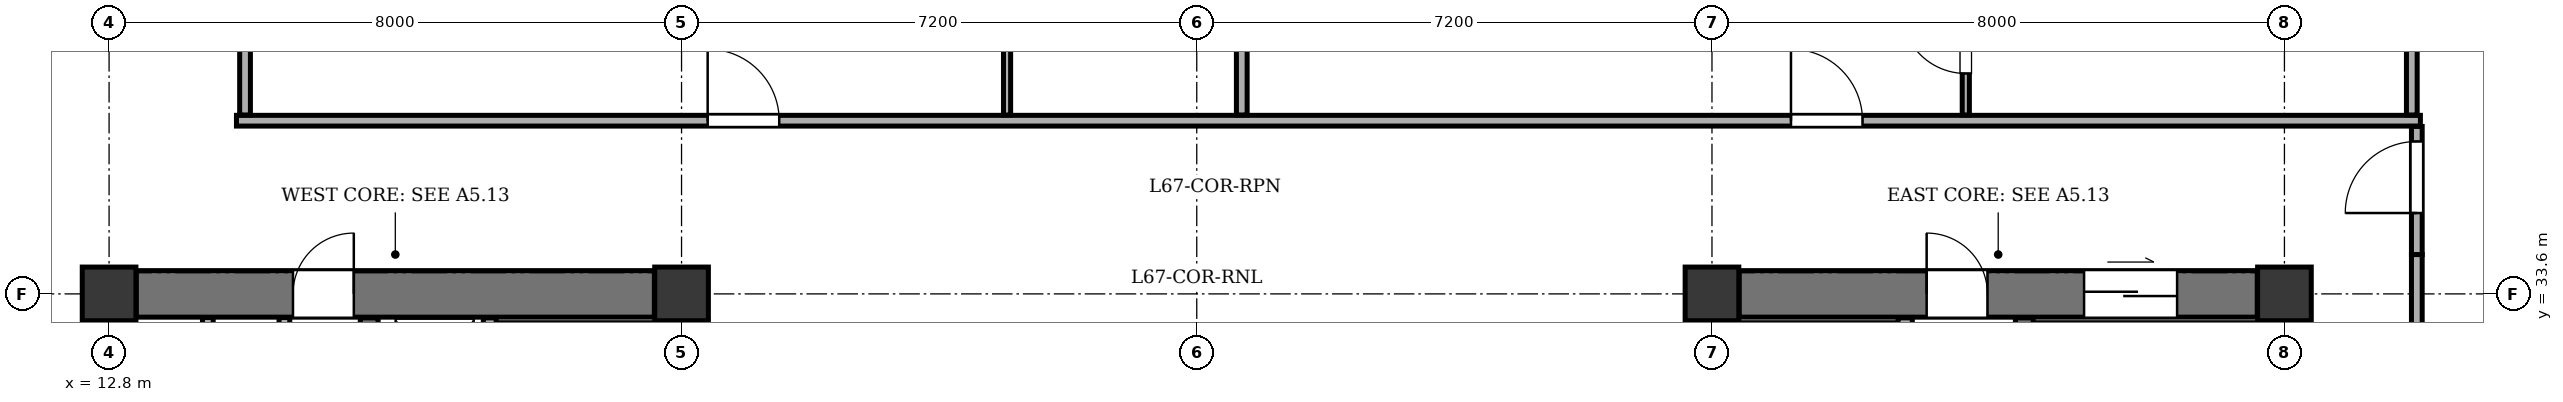
"""IFC4 building model, lengths in metres.
Left out: names, types, materials, properties, quantities, classifications, styles, units other than length and angle.
Written with IfcOpenShell. Run it as: python <this file> out.ifc"""

import sys

from ifc_helpers import new_model, si_unit, direction, frame, frame_2d, origin, origin_2d, place, context, subcontext, project, spatial, rectangle, extrude, element, fill, save


model = new_model("IFC4")
c1 = context("Model", 3, precision=1e-05, world=origin(), true_north=direction((0.0, 1.0)))
c2 = subcontext(c1, "Body", "Model", "MODEL_VIEW")
j1 = project(units=[si_unit("LENGTHUNIT", "METRE"), si_unit("PLANEANGLEUNIT", "RADIAN")], contexts=[c1])
p1 = place(None, origin())
s1 = spatial("IfcSite", under=j1, at=p1, CompositionType="ELEMENT")
p2 = place(p1, origin())
s2 = spatial("IfcBuilding", under=s1, at=p2, CompositionType="ELEMENT")
p3 = place(p2, frame((0.0, 0.0, 255.1)))
s3 = spatial("IfcBuildingStorey", under=s2, at=p3, CompositionType="ELEMENT", Elevation=255.1)
for number, where, z_axis, x_axis in (
    (1, (12.8, 33.6, 0.0), (0.0, 0.0, 1.0), (1.0, 0.0, 0.0)),
    (2, (20.8, 33.6, 0.0), (0.0, 0.0, 1.0), (1.0, 0.0, 0.0)),
    (3, (35.2, 33.6, 0.0), (0.0, 0.0, 1.0), (1.0, 0.0, 0.0)),
    (4, (43.2, 33.6, 0.0), (0.0, 0.0, 1.0), (1.0, 0.0, 0.0)),
):
    element("IfcColumn", number, at=place(p3, frame(where, z_axis=z_axis, x_axis=x_axis)), inside=s3, PredefinedType="COLUMN", context=c2, shape_type="SweptSolid", body=[
        extrude(rectangle(XDim=0.75, YDim=0.75, at=origin_2d()), origin(), (0.0, 0.0, 1.0), 3.4),
    ])
p4 = place(p3, frame((12.8, 21.18, 0.0), z_axis=(0.0, 0.0, 1.0), x_axis=(0.0, 1.0, 0.0)))
e5 = element("IfcWall", 5, at=p4, inside=s3, PredefinedType="SHEAR", context=c2, shape_type="SweptSolid", body=[
    extrude(rectangle(XDim=12.04, YDim=0.65, at=frame_2d((6.02, 0.0))), origin(), (0.0, 0.0, 1.0), 3.1),
])
p5 = place(p3, frame((13.18, 33.6, 0.0), z_axis=(0.0, 0.0, 1.0), x_axis=(1.0, 0.0, 0.0)))
e6 = element("IfcWall", 6, at=p5, inside=s3, PredefinedType="SHEAR", context=c2, shape_type="SweptSolid", body=[
    extrude(rectangle(XDim=7.24, YDim=0.65, at=frame_2d((3.62, 0.0))), origin(), (0.0, 0.0, 1.0), 3.1),
])
p6 = place(p5, frame((2.19, 0.0, 0.0)))
e7 = element("IfcOpeningElement", 7, at=p6, cuts=e6, PredefinedType="OPENING", context=c2, shape_type="SweptSolid", body=[
    extrude(rectangle(XDim=0.85, YDim=2.02, at=frame_2d((0.425, 1.01))), frame((0.0, 0.335, 0.0), z_axis=(0.0, -1.0, 0.0), x_axis=(1.0, 0.0, 0.0)), (0.0, 0.0, 1.0), 0.67),
])
p7 = place(p3, frame((20.8, 31.1, 0.0), z_axis=(0.0, 0.0, 1.0), x_axis=(0.0, 1.0, 0.0)))
e8 = element("IfcWall", 8, at=p7, inside=s3, PredefinedType="SHEAR", context=c2, shape_type="SweptSolid", body=[
    extrude(rectangle(XDim=2.12, YDim=0.65, at=frame_2d((1.06, 0.0))), origin(), (0.0, 0.0, 1.0), 3.1),
])
p8 = place(p7, frame((0.4, 0.0, 0.0)))
e9 = element("IfcOpeningElement", 9, at=p8, cuts=e8, PredefinedType="OPENING", context=c2, shape_type="SweptSolid", body=[
    extrude(rectangle(XDim=1.1, YDim=2.1, at=frame_2d((0.55, 1.05))), frame((0.0, 0.335, 0.0), z_axis=(0.0, -1.0, 0.0), x_axis=(1.0, 0.0, 0.0)), (0.0, 0.0, 1.0), 0.67),
])
p9 = place(p3, frame((16.435, 21.135, 0.0), z_axis=(0.0, 0.0, 1.0), x_axis=(0.0, 1.0, 0.0)))
e10 = element("IfcWall", 10, at=p9, inside=s3, PredefinedType="SHEAR", context=c2, shape_type="SweptSolid", body=[
    extrude(rectangle(XDim=12.13, YDim=0.25, at=frame_2d((6.065, 0.0))), origin(), (0.0, 0.0, 1.0), 3.1),
])
p10 = place(p9, frame((0.515, 0.0, 0.0)))
e11 = element("IfcOpeningElement", 11, at=p10, cuts=e10, PredefinedType="OPENING", context=c2, shape_type="SweptSolid", body=[
    extrude(rectangle(XDim=1.2, YDim=2.15, at=frame_2d((0.6, 1.075))), frame((0.0, 0.135, 0.0), z_axis=(0.0, -1.0, 0.0), x_axis=(1.0, 0.0, 0.0)), (0.0, 0.0, 1.0), 0.27),
])
p11 = place(p9, frame((2.665, 0.0, 0.0)))
e12 = element("IfcOpeningElement", 12, at=p11, cuts=e10, PredefinedType="OPENING", context=c2, shape_type="SweptSolid", body=[
    extrude(rectangle(XDim=1.15, YDim=2.15, at=frame_2d((0.575, 1.075))), frame((0.0, 0.135, 0.0), z_axis=(0.0, -1.0, 0.0), x_axis=(1.0, 0.0, 0.0)), (0.0, 0.0, 1.0), 0.27),
])
p12 = place(p3, frame((18.12, 31.17, 0.0), z_axis=(0.0, 0.0, 1.0), x_axis=(0.0, 1.0, 0.0)))
e13 = element("IfcWall", 13, at=p12, inside=s3, PredefinedType="PARTITIONING", context=c2, shape_type="SweptSolid", body=[
    extrude(rectangle(XDim=2.095, YDim=0.18, at=frame_2d((1.047, 0.0))), origin(), (0.0, 0.0, 1.0), 3.1),
])
p13 = place(p3, frame((43.2, 21.18, 0.0), z_axis=(0.0, 0.0, 1.0), x_axis=(0.0, 1.0, 0.0)))
e14 = element("IfcWall", 14, at=p13, inside=s3, PredefinedType="SHEAR", context=c2, shape_type="SweptSolid", body=[
    extrude(rectangle(XDim=12.04, YDim=0.65, at=frame_2d((6.02, 0.0))), origin(), (0.0, 0.0, 1.0), 3.1),
])
p14 = place(p3, frame((35.58, 33.6, 0.0), z_axis=(0.0, 0.0, 1.0), x_axis=(1.0, 0.0, 0.0)))
e15 = element("IfcWall", 15, at=p14, inside=s3, PredefinedType="SHEAR", context=c2, shape_type="SweptSolid", body=[
    extrude(rectangle(XDim=7.24, YDim=0.65, at=frame_2d((3.62, 0.0))), origin(), (0.0, 0.0, 1.0), 3.1),
])
p15 = place(p14, frame((4.82, 0.0, 0.0)))
e16 = element("IfcOpeningElement", 16, at=p15, cuts=e15, PredefinedType="OPENING", context=c2, shape_type="SweptSolid", body=[
    extrude(rectangle(XDim=1.3, YDim=2.15, at=frame_2d((0.65, 1.075))), frame((0.0, 0.335, 0.0), z_axis=(0.0, -1.0, 0.0), x_axis=(1.0, 0.0, 0.0)), (0.0, 0.0, 1.0), 0.67),
])
p16 = place(p14, frame((2.62, 0.0, 0.0)))
e17 = element("IfcOpeningElement", 17, at=p16, cuts=e15, PredefinedType="OPENING", context=c2, shape_type="SweptSolid", body=[
    extrude(rectangle(XDim=0.85, YDim=2.02, at=frame_2d((0.425, 1.01))), frame((0.0, 0.335, 0.0), z_axis=(0.0, -1.0, 0.0), x_axis=(1.0, 0.0, 0.0)), (0.0, 0.0, 1.0), 0.67),
])
p17 = place(p3, frame((35.2, 31.1, 0.0), z_axis=(0.0, 0.0, 1.0), x_axis=(0.0, 1.0, 0.0)))
e18 = element("IfcWall", 18, at=p17, inside=s3, PredefinedType="SHEAR", context=c2, shape_type="SweptSolid", body=[
    extrude(rectangle(XDim=2.12, YDim=0.65, at=frame_2d((1.06, 0.0))), origin(), (0.0, 0.0, 1.0), 3.1),
])
p18 = place(p17, frame((0.4, 0.0, 0.0)))
e19 = element("IfcOpeningElement", 19, at=p18, cuts=e18, PredefinedType="OPENING", context=c2, shape_type="SweptSolid", body=[
    extrude(rectangle(XDim=1.1, YDim=2.1, at=frame_2d((0.55, 1.05))), frame((0.0, 0.335, 0.0), z_axis=(0.0, -1.0, 0.0), x_axis=(1.0, 0.0, 0.0)), (0.0, 0.0, 1.0), 0.67),
])
p19 = place(p3, frame((39.565, 21.135, 0.0), z_axis=(0.0, 0.0, 1.0), x_axis=(0.0, 1.0, 0.0)))
e20 = element("IfcWall", 20, at=p19, inside=s3, PredefinedType="SHEAR", context=c2, shape_type="SweptSolid", body=[
    extrude(rectangle(XDim=12.13, YDim=0.25, at=frame_2d((6.065, 0.0))), origin(), (0.0, 0.0, 1.0), 3.1),
])
p20 = place(p19, frame((0.515, 0.0, 0.0)))
e21 = element("IfcOpeningElement", 21, at=p20, cuts=e20, PredefinedType="OPENING", context=c2, shape_type="SweptSolid", body=[
    extrude(rectangle(XDim=1.2, YDim=2.15, at=frame_2d((0.6, 1.075))), frame((0.0, 0.135, 0.0), z_axis=(0.0, -1.0, 0.0), x_axis=(1.0, 0.0, 0.0)), (0.0, 0.0, 1.0), 0.27),
])
p21 = place(p19, frame((2.665, 0.0, 0.0)))
e22 = element("IfcOpeningElement", 22, at=p21, cuts=e20, PredefinedType="OPENING", context=c2, shape_type="SweptSolid", body=[
    extrude(rectangle(XDim=1.15, YDim=2.15, at=frame_2d((0.575, 1.075))), frame((0.0, 0.135, 0.0), z_axis=(0.0, -1.0, 0.0), x_axis=(1.0, 0.0, 0.0)), (0.0, 0.0, 1.0), 0.27),
])
p22 = place(p3, frame((37.9, 25.27, 0.0), z_axis=(0.0, 0.0, 1.0), x_axis=(0.0, 1.0, 0.0)))
e23 = element("IfcWall", 23, at=p22, inside=s3, PredefinedType="SOLIDWALL", context=c2, shape_type="SweptSolid", body=[
    extrude(rectangle(XDim=7.995, YDim=0.2, at=frame_2d((3.998, 0.0))), origin(), (0.0, 0.0, 1.0), 3.1),
])
p23 = place(p3, frame((14.18, 30.96, 0.0), z_axis=(0.0, 0.0, 1.0), x_axis=(0.0, 1.0, 0.0)))
e24 = element("IfcWall", 24, at=p23, inside=s3, PredefinedType="PARTITIONING", context=c2, shape_type="SweptSolid", body=[
    extrude(rectangle(XDim=2.31, YDim=0.15, at=frame_2d((1.155, 0.0))), origin(), (0.0, 0.0, 1.0), 3.1),
])
p24 = place(p23, frame((0.47, 0.0, 0.0)))
e25 = element("IfcOpeningElement", 25, at=p24, cuts=e24, PredefinedType="OPENING", context=c2, shape_type="SweptSolid", body=[
    extrude(rectangle(XDim=0.85, YDim=2.02, at=frame_2d((0.425, 1.01))), frame((0.0, 0.085, 0.0), z_axis=(0.0, -1.0, 0.0), x_axis=(1.0, 0.0, 0.0)), (0.0, 0.0, 1.0), 0.17),
])
p25 = place(p3, frame((15.25, 30.96, 0.0), z_axis=(0.0, 0.0, 1.0), x_axis=(0.0, 1.0, 0.0)))
e26 = element("IfcWall", 26, at=p25, inside=s3, PredefinedType="PARTITIONING", context=c2, shape_type="SweptSolid", body=[
    extrude(rectangle(XDim=2.31, YDim=0.15, at=frame_2d((1.155, 0.0))), origin(), (0.0, 0.0, 1.0), 3.1),
])
p26 = place(p25, frame((0.47, 0.0, 0.0)))
e27 = element("IfcOpeningElement", 27, at=p26, cuts=e26, PredefinedType="OPENING", context=c2, shape_type="SweptSolid", body=[
    extrude(rectangle(XDim=0.85, YDim=2.02, at=frame_2d((0.425, 1.01))), frame((0.0, 0.085, 0.0), z_axis=(0.0, -1.0, 0.0), x_axis=(1.0, 0.0, 0.0)), (0.0, 0.0, 1.0), 0.17),
])
p27 = place(p3, frame((14.58, 36.02, 0.0), z_axis=(0.0, 0.0, 1.0), x_axis=(1.0, 0.0, 0.0)))
e28 = element("IfcWall", 28, at=p27, inside=s3, PredefinedType="PARTITIONING", context=c2, shape_type="SweptSolid", body=[
    extrude(rectangle(XDim=30.52, YDim=0.15, at=frame_2d((15.26, 0.0))), origin(), (0.0, 0.0, 1.0), 3.1),
])
p28 = place(p27, frame((6.585, 0.0, 0.0)))
e29 = element("IfcOpeningElement", 29, at=p28, cuts=e28, PredefinedType="OPENING", context=c2, shape_type="SweptSolid", body=[
    extrude(rectangle(XDim=1.0, YDim=2.1, at=frame_2d((0.5, 1.05))), frame((0.0, 0.085, 0.0), z_axis=(0.0, -1.0, 0.0), x_axis=(1.0, 0.0, 0.0)), (0.0, 0.0, 1.0), 0.17),
])
p29 = place(p27, frame((21.724, 0.0, 0.0)))
e30 = element("IfcOpeningElement", 30, at=p29, cuts=e28, PredefinedType="OPENING", context=c2, shape_type="SweptSolid", body=[
    extrude(rectangle(XDim=1.0, YDim=2.1, at=frame_2d((0.5, 1.05))), frame((0.0, 0.085, 0.0), z_axis=(0.0, -1.0, 0.0), x_axis=(1.0, 0.0, 0.0)), (0.0, 0.0, 1.0), 0.17),
])
p30 = place(p3, frame((14.7, 36.1, 0.0), z_axis=(0.0, 0.0, 1.0), x_axis=(0.0, 1.0, 0.0)))
e31 = element("IfcWall", 31, at=p30, inside=s3, PredefinedType="PARTITIONING", context=c2, shape_type="SweptSolid", body=[
    extrude(rectangle(XDim=8.655, YDim=0.15, at=frame_2d((4.327, 0.0))), origin(), (0.0, 0.0, 1.0), 3.1),
])
p31 = place(p3, frame((25.349, 36.1, 0.0), z_axis=(0.0, 0.0, 1.0), x_axis=(0.0, 1.0, 0.0)))
e32 = element("IfcWall", 32, at=p31, inside=s3, PredefinedType="PARTITIONING", context=c2, shape_type="SweptSolid", body=[
    extrude(rectangle(XDim=6.095, YDim=0.1, at=frame_2d((3.047, 0.0))), origin(), (0.0, 0.0, 1.0), 3.1),
])
p32 = place(p31, frame((2.585, 0.0, 0.0)))
e33 = element("IfcOpeningElement", 33, at=p32, cuts=e32, PredefinedType="OPENING", context=c2, shape_type="SweptSolid", body=[
    extrude(rectangle(XDim=0.9, YDim=2.05, at=frame_2d((0.45, 1.025))), frame((0.0, 0.06, 0.0), z_axis=(0.0, -1.0, 0.0), x_axis=(1.0, 0.0, 0.0)), (0.0, 0.0, 1.0), 0.12),
])
p33 = place(p3, frame((28.629, 36.1, 0.0), z_axis=(0.0, 0.0, 1.0), x_axis=(0.0, 1.0, 0.0)))
e34 = element("IfcWall", 34, at=p33, inside=s3, PredefinedType="PARTITIONING", context=c2, shape_type="SweptSolid", body=[
    extrude(rectangle(XDim=8.655, YDim=0.15, at=frame_2d((4.327, 0.0))), origin(), (0.0, 0.0, 1.0), 3.1),
])
p34 = place(p3, frame((38.747, 36.1, 0.0), z_axis=(0.0, 0.0, 1.0), x_axis=(0.0, 1.0, 0.0)))
e35 = element("IfcWall", 35, at=p34, inside=s3, PredefinedType="PARTITIONING", context=c2, shape_type="SweptSolid", body=[
    extrude(rectangle(XDim=6.095, YDim=0.1, at=frame_2d((3.047, 0.0))), origin(), (0.0, 0.0, 1.0), 3.1),
])
p35 = place(p34, frame((0.58, 0.0, 0.0)))
e36 = element("IfcOpeningElement", 36, at=p35, cuts=e35, PredefinedType="OPENING", context=c2, shape_type="SweptSolid", body=[
    extrude(rectangle(XDim=0.9, YDim=2.05, at=frame_2d((0.45, 1.025))), frame((0.0, 0.06, 0.0), z_axis=(0.0, -1.0, 0.0), x_axis=(1.0, 0.0, 0.0)), (0.0, 0.0, 1.0), 0.12),
])
p36 = place(p3, frame((44.98, 36.1, 0.0), z_axis=(0.0, 0.0, 1.0), x_axis=(0.0, 1.0, 0.0)))
e37 = element("IfcWall", 37, at=p36, inside=s3, PredefinedType="PARTITIONING", context=c2, shape_type="SweptSolid", body=[
    extrude(rectangle(XDim=8.655, YDim=0.15, at=frame_2d((4.327, 0.0))), origin(), (0.0, 0.0, 1.0), 2.725),
])
p37 = place(p3, frame((45.05, 20.25, 0.0), z_axis=(0.0, 0.0, 1.0), x_axis=(0.0, 1.0, 0.0)))
e38 = element("IfcWall", 38, at=p37, inside=s3, PredefinedType="PARTITIONING", context=c2, shape_type="SweptSolid", body=[
    extrude(rectangle(XDim=13.9, YDim=0.15, at=frame_2d((6.95, 0.0))), origin(), (0.0, 0.0, 1.0), 2.725),
])
p38 = place(p3, frame((45.05, 34.15, 0.0), z_axis=(0.0, 0.0, 1.0), x_axis=(0.0, 1.0, 0.0)))
e39 = element("IfcWall", 39, at=p38, inside=s3, PredefinedType="PARTITIONING", context=c2, shape_type="SweptSolid", body=[
    extrude(rectangle(XDim=1.79, YDim=0.15, at=frame_2d((0.895, 0.0))), origin(), (0.0, 0.0, 1.0), 2.725),
])
p39 = place(p38, frame((0.58, 0.0, 0.0)))
e40 = element("IfcOpeningElement", 40, at=p39, cuts=e39, PredefinedType="OPENING", context=c2, shape_type="SweptSolid", body=[
    extrude(rectangle(XDim=1.0, YDim=2.1, at=frame_2d((0.5, 1.05))), frame((0.0, 0.085, 0.0), z_axis=(0.0, -1.0, 0.0), x_axis=(1.0, 0.0, 0.0)), (0.0, 0.0, 1.0), 0.17),
])
p40 = place(p6, origin())
e41 = element("IfcDoor", 41, at=p40, inside=s3, OperationType="SINGLE_SWING_RIGHT", PredefinedType="DOOR", context=c2, shape_type="SweptSolid", body=[
    extrude(rectangle(XDim=0.85, YDim=2.02, at=frame_2d((0.425, 1.01))), frame((0.0, 0.025, 0.0), z_axis=(0.0, -1.0, 0.0), x_axis=(1.0, 0.0, 0.0)), (0.0, 0.0, 1.0), 0.05),
])
fill(e7, e41)
p41 = place(p15, origin())
e42 = element("IfcDoor", 42, at=p41, inside=s3, OperationType="DOUBLE_DOOR_SLIDING", PredefinedType="DOOR", context=c2, shape_type="SweptSolid", body=[
    extrude(rectangle(XDim=1.3, YDim=2.15, at=frame_2d((0.65, 1.075))), frame((0.0, 0.025, 0.0), z_axis=(0.0, -1.0, 0.0), x_axis=(1.0, 0.0, 0.0)), (0.0, 0.0, 1.0), 0.05),
])
fill(e16, e42)
p42 = place(p16, origin())
e43 = element("IfcDoor", 43, at=p42, inside=s3, OperationType="SINGLE_SWING_LEFT", PredefinedType="DOOR", context=c2, shape_type="SweptSolid", body=[
    extrude(rectangle(XDim=0.85, YDim=2.02, at=frame_2d((0.425, 1.01))), frame((0.0, 0.025, 0.0), z_axis=(0.0, -1.0, 0.0), x_axis=(1.0, 0.0, 0.0)), (0.0, 0.0, 1.0), 0.05),
])
fill(e17, e43)
p43 = place(p28, origin())
e44 = element("IfcDoor", 44, at=p43, inside=s3, OperationType="SINGLE_SWING_LEFT", PredefinedType="DOOR", context=c2, shape_type="SweptSolid", body=[
    extrude(rectangle(XDim=1.0, YDim=2.1, at=frame_2d((0.5, 1.05))), frame((0.0, 0.025, 0.0), z_axis=(0.0, -1.0, 0.0), x_axis=(1.0, 0.0, 0.0)), (0.0, 0.0, 1.0), 0.05),
])
fill(e29, e44)
p44 = place(p29, origin())
e45 = element("IfcDoor", 45, at=p44, inside=s3, OperationType="SINGLE_SWING_LEFT", PredefinedType="DOOR", context=c2, shape_type="SweptSolid", body=[
    extrude(rectangle(XDim=1.0, YDim=2.1, at=frame_2d((0.5, 1.05))), frame((0.0, 0.025, 0.0), z_axis=(0.0, -1.0, 0.0), x_axis=(1.0, 0.0, 0.0)), (0.0, 0.0, 1.0), 0.05),
])
fill(e30, e45)
p45 = place(p35, origin())
e46 = element("IfcDoor", 46, at=p45, inside=s3, OperationType="SINGLE_SWING_RIGHT", PredefinedType="DOOR", context=c2, shape_type="SweptSolid", body=[
    extrude(rectangle(XDim=0.9, YDim=2.05, at=frame_2d((0.45, 1.025))), frame((0.0, 0.025, 0.0), z_axis=(0.0, -1.0, 0.0), x_axis=(1.0, 0.0, 0.0)), (0.0, 0.0, 1.0), 0.05),
])
fill(e36, e46)
p46 = place(p39, origin())
e47 = element("IfcDoor", 47, at=p46, inside=s3, OperationType="SINGLE_SWING_LEFT", PredefinedType="DOOR", context=c2, shape_type="SweptSolid", body=[
    extrude(rectangle(XDim=1.0, YDim=2.1, at=frame_2d((0.5, 1.05))), frame((0.0, 0.025, 0.0), z_axis=(0.0, -1.0, 0.0), x_axis=(1.0, 0.0, 0.0)), (0.0, 0.0, 1.0), 0.05),
])
fill(e40, e47)
save(model, sys.argv[1])
